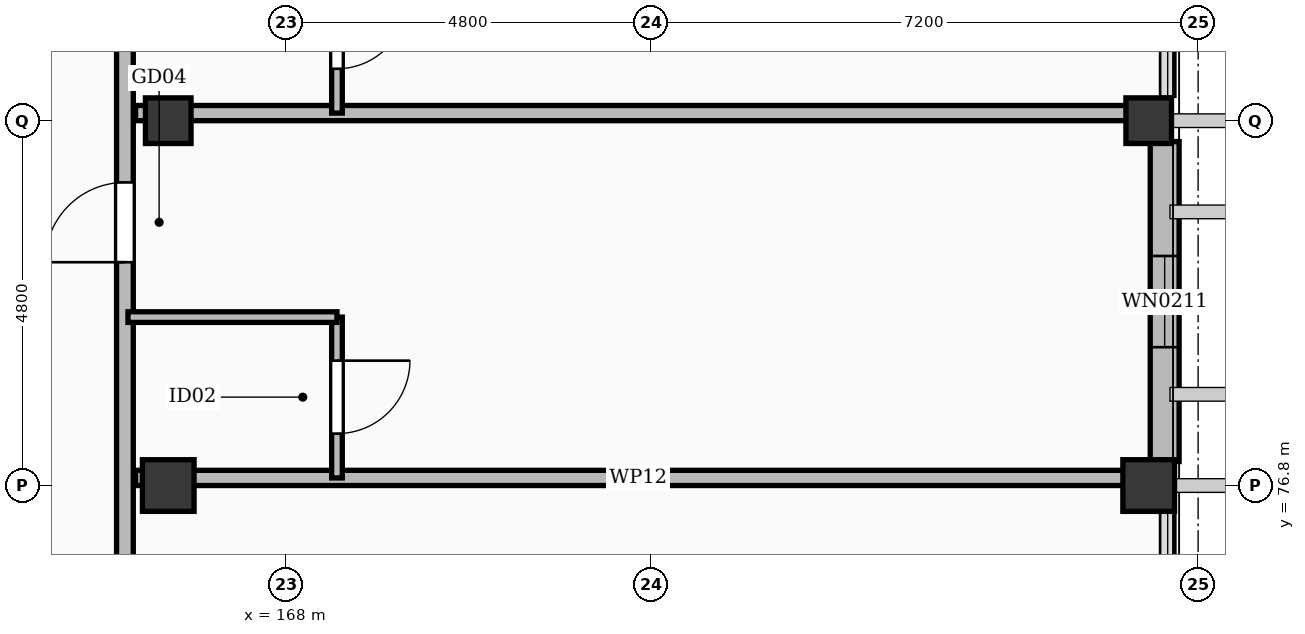
"""IFC4 building model, lengths in metres.
Left out: names, types, materials, properties, quantities, classifications, styles, units other than length and angle.
Written with IfcOpenShell. Run it as: python <this file> out.ifc"""

import sys

from ifc_helpers import new_model, si_unit, direction, frame, frame_2d, origin, origin_2d, place, context, subcontext, project, spatial, rectangle, extrude, element, fill, save


model = new_model("IFC4")
c1 = context("Model", 3, precision=1e-05, world=origin(), true_north=direction((0.0, 1.0)))
c2 = subcontext(c1, "Body", "Model", "MODEL_VIEW")
j1 = project(units=[si_unit("LENGTHUNIT", "METRE"), si_unit("PLANEANGLEUNIT", "RADIAN")], contexts=[c1])
p1 = place(None, origin())
s1 = spatial("IfcSite", under=j1, at=p1, CompositionType="ELEMENT")
p2 = place(p1, origin())
s2 = spatial("IfcBuilding", under=s1, at=p2, CompositionType="ELEMENT")
p3 = place(p2, frame((0.0, 0.0, 35.4)))
s3 = spatial("IfcBuildingStorey", under=s2, at=p3, CompositionType="ELEMENT", Elevation=35.4)
for number, where, z_axis, x_axis in (
    (1, (166.45, 76.8, 0.0), (0.0, 0.0, 1.0), (1.0, 0.0, 0.0)),
    (2, (179.35, 76.8, 0.0), (0.0, 0.0, 1.0), (1.0, 0.0, 0.0)),
):
    element("IfcColumn", number, at=place(p3, frame(where, z_axis=z_axis, x_axis=x_axis)), inside=s3, PredefinedType="COLUMN", context=c2, shape_type="SweptSolid", body=[
        extrude(rectangle(XDim=0.68, YDim=0.68, at=origin_2d()), origin(), (0.0, 0.0, 1.0), 3.6),
    ])
for number, where, z_axis, x_axis in (
    (3, (166.45, 81.6, 0.0), (0.0, 0.0, 1.0), (1.0, 0.0, 0.0)),
    (4, (179.35, 81.6, 0.0), (0.0, 0.0, 1.0), (1.0, 0.0, 0.0)),
):
    element("IfcColumn", number, at=place(p3, frame(where, z_axis=z_axis, x_axis=x_axis)), inside=s3, PredefinedType="COLUMN", context=c2, shape_type="SweptSolid", body=[
        extrude(rectangle(XDim=0.6, YDim=0.6, at=origin_2d()), origin(), (0.0, 0.0, 1.0), 3.6),
    ])
p4 = place(p3, frame((179.56, 81.325, 0.0), z_axis=(0.0, 0.0, 1.0), x_axis=(0.0, -1.0, 0.0)))
e5 = element("IfcWall", 5, at=p4, inside=s3, PredefinedType="SOLIDWALL", context=c2, shape_type="SweptSolid", body=[
    extrude(rectangle(XDim=4.21, YDim=0.38, at=frame_2d((2.105, 0.0))), origin(), (0.0, 0.0, 1.0), 2.602),
])
p5 = place(p4, frame((1.505, 0.0, 0.55)))
e6 = element("IfcOpeningElement", 6, at=p5, cuts=e5, PredefinedType="OPENING", context=c2, shape_type="SweptSolid", body=[
    extrude(rectangle(XDim=1.2, YDim=1.72, at=frame_2d((0.6, 0.86))), frame((0.0, 0.202, 0.0), z_axis=(0.0, -1.0, 0.0), x_axis=(1.0, 0.0, 0.0)), (0.0, 0.0, 1.0), 0.404),
])
p6 = place(p3, frame((165.88, 53.15, 0.0), z_axis=(0.0, 0.0, 1.0), x_axis=(0.0, 1.0, 0.0)))
e7 = element("IfcWall", 7, at=p6, inside=s3, PredefinedType="PARTITIONING", context=c2, shape_type="SweptSolid", body=[
    extrude(rectangle(XDim=72.5, YDim=0.22, at=frame_2d((36.25, 0.0))), origin(), (0.0, 0.0, 1.0), 2.602),
])
p7 = place(p6, frame((0.691, 0.0, 0.0)))
e8 = element("IfcOpeningElement", 8, at=p7, cuts=e7, PredefinedType="OPENING", context=c2, shape_type="SweptSolid", body=[
    extrude(rectangle(XDim=1.02, YDim=2.2, at=frame_2d((0.51, 1.1))), frame((0.0, 0.122, 0.0), z_axis=(0.0, -1.0, 0.0), x_axis=(1.0, 0.0, 0.0)), (0.0, 0.0, 1.0), 0.244),
])
p8 = place(p6, frame((7.388, 0.0, 0.0)))
e9 = element("IfcOpeningElement", 9, at=p8, cuts=e7, PredefinedType="OPENING", context=c2, shape_type="SweptSolid", body=[
    extrude(rectangle(XDim=1.14, YDim=2.26, at=frame_2d((0.57, 1.13))), frame((0.0, 0.122, 0.0), z_axis=(0.0, -1.0, 0.0), x_axis=(1.0, 0.0, 0.0)), (0.0, 0.0, 1.0), 0.244),
])
p9 = place(p6, frame((12.188, 0.0, 0.0)))
e10 = element("IfcOpeningElement", 10, at=p9, cuts=e7, PredefinedType="OPENING", context=c2, shape_type="SweptSolid", body=[
    extrude(rectangle(XDim=0.98, YDim=2.15, at=frame_2d((0.49, 1.075))), frame((0.0, 0.122, 0.0), z_axis=(0.0, -1.0, 0.0), x_axis=(1.0, 0.0, 0.0)), (0.0, 0.0, 1.0), 0.244),
])
p10 = place(p6, frame((16.988, 0.0, 0.0)))
e11 = element("IfcOpeningElement", 11, at=p10, cuts=e7, PredefinedType="OPENING", context=c2, shape_type="SweptSolid", body=[
    extrude(rectangle(XDim=1.28, YDim=2.16, at=frame_2d((0.64, 1.08))), frame((0.0, 0.122, 0.0), z_axis=(0.0, -1.0, 0.0), x_axis=(1.0, 0.0, 0.0)), (0.0, 0.0, 1.0), 0.244),
])
p11 = place(p6, frame((21.788, 0.0, 0.0)))
e12 = element("IfcOpeningElement", 12, at=p11, cuts=e7, PredefinedType="OPENING", context=c2, shape_type="SweptSolid", body=[
    extrude(rectangle(XDim=0.9, YDim=2.08, at=frame_2d((0.45, 1.04))), frame((0.0, 0.122, 0.0), z_axis=(0.0, -1.0, 0.0), x_axis=(1.0, 0.0, 0.0)), (0.0, 0.0, 1.0), 0.244),
])
p12 = place(p6, frame((26.588, 0.0, 0.0)))
e13 = element("IfcOpeningElement", 13, at=p12, cuts=e7, PredefinedType="OPENING", context=c2, shape_type="SweptSolid", body=[
    extrude(rectangle(XDim=1.05, YDim=2.22, at=frame_2d((0.525, 1.11))), frame((0.0, 0.122, 0.0), z_axis=(0.0, -1.0, 0.0), x_axis=(1.0, 0.0, 0.0)), (0.0, 0.0, 1.0), 0.244),
])
p13 = place(p6, frame((31.388, 0.0, 0.0)))
e14 = element("IfcOpeningElement", 14, at=p13, cuts=e7, PredefinedType="OPENING", context=c2, shape_type="SweptSolid", body=[
    extrude(rectangle(XDim=1.02, YDim=2.2, at=frame_2d((0.51, 1.1))), frame((0.0, 0.122, 0.0), z_axis=(0.0, -1.0, 0.0), x_axis=(1.0, 0.0, 0.0)), (0.0, 0.0, 1.0), 0.244),
])
p14 = place(p6, frame((36.188, 0.0, 0.0)))
e15 = element("IfcOpeningElement", 15, at=p14, cuts=e7, PredefinedType="OPENING", context=c2, shape_type="SweptSolid", body=[
    extrude(rectangle(XDim=1.14, YDim=2.26, at=frame_2d((0.57, 1.13))), frame((0.0, 0.122, 0.0), z_axis=(0.0, -1.0, 0.0), x_axis=(1.0, 0.0, 0.0)), (0.0, 0.0, 1.0), 0.244),
])
p15 = place(p6, frame((40.988, 0.0, 0.0)))
e16 = element("IfcOpeningElement", 16, at=p15, cuts=e7, PredefinedType="OPENING", context=c2, shape_type="SweptSolid", body=[
    extrude(rectangle(XDim=0.98, YDim=2.15, at=frame_2d((0.49, 1.075))), frame((0.0, 0.122, 0.0), z_axis=(0.0, -1.0, 0.0), x_axis=(1.0, 0.0, 0.0)), (0.0, 0.0, 1.0), 0.244),
])
p16 = place(p6, frame((45.788, 0.0, 0.0)))
e17 = element("IfcOpeningElement", 17, at=p16, cuts=e7, PredefinedType="OPENING", context=c2, shape_type="SweptSolid", body=[
    extrude(rectangle(XDim=1.28, YDim=2.16, at=frame_2d((0.64, 1.08))), frame((0.0, 0.122, 0.0), z_axis=(0.0, -1.0, 0.0), x_axis=(1.0, 0.0, 0.0)), (0.0, 0.0, 1.0), 0.244),
])
p17 = place(p6, frame((50.588, 0.0, 0.0)))
e18 = element("IfcOpeningElement", 18, at=p17, cuts=e7, PredefinedType="OPENING", context=c2, shape_type="SweptSolid", body=[
    extrude(rectangle(XDim=0.9, YDim=2.08, at=frame_2d((0.45, 1.04))), frame((0.0, 0.122, 0.0), z_axis=(0.0, -1.0, 0.0), x_axis=(1.0, 0.0, 0.0)), (0.0, 0.0, 1.0), 0.244),
])
p18 = place(p6, frame((55.388, 0.0, 0.0)))
e19 = element("IfcOpeningElement", 19, at=p18, cuts=e7, PredefinedType="OPENING", context=c2, shape_type="SweptSolid", body=[
    extrude(rectangle(XDim=1.05, YDim=2.22, at=frame_2d((0.525, 1.11))), frame((0.0, 0.122, 0.0), z_axis=(0.0, -1.0, 0.0), x_axis=(1.0, 0.0, 0.0)), (0.0, 0.0, 1.0), 0.244),
])
p19 = place(p6, frame((60.188, 0.0, 0.0)))
e20 = element("IfcOpeningElement", 20, at=p19, cuts=e7, PredefinedType="OPENING", context=c2, shape_type="SweptSolid", body=[
    extrude(rectangle(XDim=1.02, YDim=2.2, at=frame_2d((0.51, 1.1))), frame((0.0, 0.122, 0.0), z_axis=(0.0, -1.0, 0.0), x_axis=(1.0, 0.0, 0.0)), (0.0, 0.0, 1.0), 0.244),
])
p20 = place(p6, frame((64.988, 0.0, 0.0)))
e21 = element("IfcOpeningElement", 21, at=p20, cuts=e7, PredefinedType="OPENING", context=c2, shape_type="SweptSolid", body=[
    extrude(rectangle(XDim=1.14, YDim=2.26, at=frame_2d((0.57, 1.13))), frame((0.0, 0.122, 0.0), z_axis=(0.0, -1.0, 0.0), x_axis=(1.0, 0.0, 0.0)), (0.0, 0.0, 1.0), 0.244),
])
p21 = place(p6, frame((69.788, 0.0, 0.0)))
e22 = element("IfcOpeningElement", 22, at=p21, cuts=e7, PredefinedType="OPENING", context=c2, shape_type="SweptSolid", body=[
    extrude(rectangle(XDim=0.98, YDim=2.15, at=frame_2d((0.49, 1.075))), frame((0.0, 0.122, 0.0), z_axis=(0.0, -1.0, 0.0), x_axis=(1.0, 0.0, 0.0)), (0.0, 0.0, 1.0), 0.244),
])
p22 = place(p3, frame((166.02, 76.9, 0.0), z_axis=(0.0, 0.0, 1.0), x_axis=(1.0, 0.0, 0.0)))
e23 = element("IfcWall", 23, at=p22, inside=s3, PredefinedType="PARTITIONING", context=c2, shape_type="SweptSolid", body=[
    extrude(rectangle(XDim=13.23, YDim=0.2, at=frame_2d((6.615, 0.0))), origin(), (0.0, 0.0, 1.0), 2.602),
])
p23 = place(p3, frame((168.67, 76.9, 0.0), z_axis=(0.0, 0.0, 1.0), x_axis=(0.0, 1.0, 0.0)))
e24 = element("IfcWall", 24, at=p23, inside=s3, PredefinedType="PARTITIONING", context=c2, shape_type="SweptSolid", body=[
    extrude(rectangle(XDim=2.116, YDim=0.14, at=frame_2d((1.058, 0.0))), origin(), (0.0, 0.0, 1.0), 2.732),
])
p24 = place(p23, frame((0.583, 0.0, 0.0)))
e25 = element("IfcOpeningElement", 25, at=p24, cuts=e24, PredefinedType="OPENING", context=c2, shape_type="SweptSolid", body=[
    extrude(rectangle(XDim=0.96, YDim=2.12, at=frame_2d((0.48, 1.06))), frame((0.0, 0.082, 0.0), z_axis=(0.0, -1.0, 0.0), x_axis=(1.0, 0.0, 0.0)), (0.0, 0.0, 1.0), 0.164),
])
p25 = place(p3, frame((165.92, 79.016, 0.0), z_axis=(0.0, 0.0, 1.0), x_axis=(1.0, 0.0, 0.0)))
e26 = element("IfcWall", 26, at=p25, inside=s3, PredefinedType="PARTITIONING", context=c2, shape_type="SweptSolid", body=[
    extrude(rectangle(XDim=2.75, YDim=0.14, at=frame_2d((1.375, 0.0))), origin(), (0.0, 0.0, 1.0), 2.732),
])
p26 = place(p3, frame((166.02, 81.7, 0.0), z_axis=(0.0, 0.0, 1.0), x_axis=(1.0, 0.0, 0.0)))
e27 = element("IfcWall", 27, at=p26, inside=s3, PredefinedType="PARTITIONING", context=c2, shape_type="SweptSolid", body=[
    extrude(rectangle(XDim=13.23, YDim=0.2, at=frame_2d((6.615, 0.0))), origin(), (0.0, 0.0, 1.0), 2.602),
])
p27 = place(p3, frame((168.67, 81.7, 0.0), z_axis=(0.0, 0.0, 1.0), x_axis=(0.0, 1.0, 0.0)))
e28 = element("IfcWall", 28, at=p27, inside=s3, PredefinedType="PARTITIONING", context=c2, shape_type="SweptSolid", body=[
    extrude(rectangle(XDim=2.116, YDim=0.14, at=frame_2d((1.058, 0.0))), origin(), (0.0, 0.0, 1.0), 2.732),
])
p28 = place(p27, frame((0.583, 0.0, 0.0)))
e29 = element("IfcOpeningElement", 29, at=p28, cuts=e28, PredefinedType="OPENING", context=c2, shape_type="SweptSolid", body=[
    extrude(rectangle(XDim=0.92, YDim=2.1, at=frame_2d((0.46, 1.05))), frame((0.0, 0.082, 0.0), z_axis=(0.0, -1.0, 0.0), x_axis=(1.0, 0.0, 0.0)), (0.0, 0.0, 1.0), 0.164),
])
p29 = place(p5, origin())
e30 = element("IfcWindow", 30, at=p29, inside=s3, PartitioningType="SINGLE_PANEL", PredefinedType="WINDOW", context=c2, shape_type="SweptSolid", body=[
    extrude(rectangle(XDim=1.2, YDim=1.72, at=frame_2d((0.6, 0.86))), frame((0.0, 0.03, 0.0), z_axis=(0.0, -1.0, 0.0), x_axis=(1.0, 0.0, 0.0)), (0.0, 0.0, 1.0), 0.06),
])
fill(e6, e30)
p30 = place(p12, origin())
e31 = element("IfcDoor", 31, at=p30, inside=s3, OperationType="SINGLE_SWING_LEFT", PredefinedType="DOOR", context=c2, shape_type="SweptSolid", body=[
    extrude(rectangle(XDim=1.05, YDim=2.22, at=frame_2d((0.525, 1.11))), frame((0.0, 0.025, 0.0), z_axis=(0.0, -1.0, 0.0), x_axis=(1.0, 0.0, 0.0)), (0.0, 0.0, 1.0), 0.05),
])
fill(e13, e31)
p31 = place(p24, frame((0.96, 0.0, 0.0), z_axis=(0.0, 0.0, 1.0), x_axis=(-1.0, 0.0, 0.0)))
e32 = element("IfcDoor", 32, at=p31, inside=s3, OperationType="SINGLE_SWING_RIGHT", PredefinedType="DOOR", context=c2, shape_type="SweptSolid", body=[
    extrude(rectangle(XDim=0.96, YDim=2.12, at=frame_2d((0.48, 1.06))), frame((0.0, 0.025, 0.0), z_axis=(0.0, -1.0, 0.0), x_axis=(1.0, 0.0, 0.0)), (0.0, 0.0, 1.0), 0.05),
])
fill(e25, e32)
p32 = place(p28, frame((0.92, 0.0, 0.0), z_axis=(0.0, 0.0, 1.0), x_axis=(-1.0, 0.0, 0.0)))
e33 = element("IfcDoor", 33, at=p32, inside=s3, OperationType="SINGLE_SWING_RIGHT", PredefinedType="DOOR", context=c2, shape_type="SweptSolid", body=[
    extrude(rectangle(XDim=0.92, YDim=2.1, at=frame_2d((0.46, 1.05))), frame((0.0, 0.025, 0.0), z_axis=(0.0, -1.0, 0.0), x_axis=(1.0, 0.0, 0.0)), (0.0, 0.0, 1.0), 0.05),
])
fill(e29, e33)
save(model, sys.argv[1])
